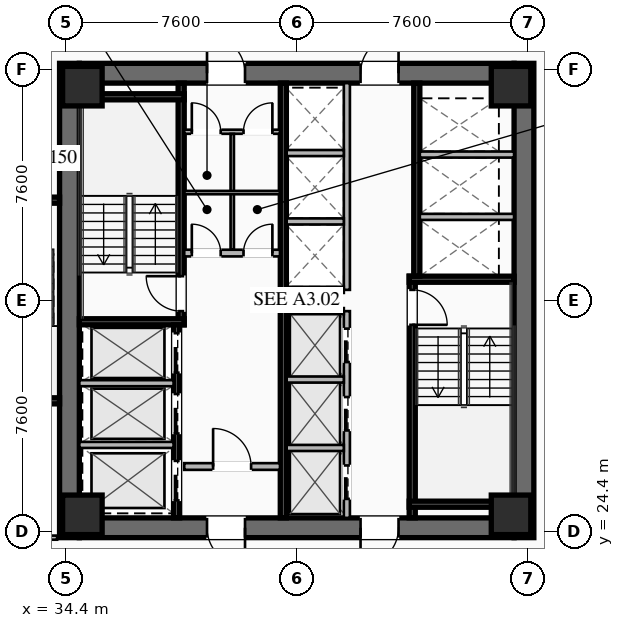
"""IFC4 building model, lengths in metres.
Left out: names, types, materials, properties, quantities, classifications, styles, units other than length and angle.
Written with IfcOpenShell. Run it as: python <this file> out.ifc"""

import sys

from ifc_helpers import new_model, si_unit, direction, frame, frame_2d, origin, origin_2d, place, context, subcontext, project, spatial, rectangle, hollow_rectangle, extrude, element, fill, save


model = new_model("IFC4")
c1 = context("Model", 3, precision=1e-05, world=origin(), true_north=direction((0.0, 1.0)))
c2 = subcontext(c1, "Body", "Model", "MODEL_VIEW")
j1 = project(units=[si_unit("LENGTHUNIT", "METRE"), si_unit("PLANEANGLEUNIT", "RADIAN")], contexts=[c1])
p1 = place(None, origin())
s1 = spatial("IfcSite", under=j1, at=p1, CompositionType="ELEMENT")
p2 = place(p1, origin())
s2 = spatial("IfcBuilding", under=s1, at=p2, CompositionType="ELEMENT")
p3 = place(p2, frame((0.0, 0.0, 45.9)))
s3 = spatial("IfcBuildingStorey", under=s2, at=p3, CompositionType="ELEMENT", Elevation=45.9)
for number, where, z_axis, x_axis in (
    (1, (34.525, 24.2, 0.0), (0.0, 0.0, 1.0), (0.0, 1.0, 0.0)),
    (2, (49.475, 39.8, 0.0), (0.0, 0.0, 1.0), (0.0, -1.0, 0.0)),
):
    element("IfcWall", number, at=place(p3, frame(where, z_axis=z_axis, x_axis=x_axis)), inside=s3, PredefinedType="SHEAR", context=c2, shape_type="SweptSolid", body=[
        extrude(rectangle(XDim=15.6, YDim=0.65, at=frame_2d((7.8, 0.0))), origin(), (0.0, 0.0, 1.0), 3.55),
    ])
p4 = place(p3, frame((49.15, 24.525, 0.0), z_axis=(0.0, 0.0, 1.0), x_axis=(-1.0, 0.0, 0.0)))
e3 = element("IfcWall", 3, at=p4, inside=s3, PredefinedType="SHEAR", context=c2, shape_type="SweptSolid", body=[
    extrude(rectangle(XDim=14.3, YDim=0.65, at=frame_2d((7.15, 0.0))), origin(), (0.0, 0.0, 1.0), 3.55),
])
p5 = place(p4, frame((8.85, 0.0, 0.0)))
e4 = element("IfcOpeningElement", 4, at=p5, cuts=e3, PredefinedType="OPENING", context=c2, shape_type="SweptSolid", body=[
    extrude(rectangle(XDim=1.25, YDim=2.25, at=frame_2d((0.625, 1.125))), frame((0.0, 0.335, 0.0), z_axis=(0.0, -1.0, 0.0), x_axis=(1.0, 0.0, 0.0)), (0.0, 0.0, 1.0), 0.67),
])
p6 = place(p4, frame((3.8, 0.0, 0.0)))
e5 = element("IfcOpeningElement", 5, at=p6, cuts=e3, PredefinedType="OPENING", context=c2, shape_type="SweptSolid", body=[
    extrude(rectangle(XDim=1.25, YDim=2.25, at=frame_2d((0.625, 1.125))), frame((0.0, 0.335, 0.0), z_axis=(0.0, -1.0, 0.0), x_axis=(1.0, 0.0, 0.0)), (0.0, 0.0, 1.0), 0.67),
])
p7 = place(p3, frame((34.85, 39.475, 0.0), z_axis=(0.0, 0.0, 1.0), x_axis=(1.0, 0.0, 0.0)))
e6 = element("IfcWall", 6, at=p7, inside=s3, PredefinedType="SHEAR", context=c2, shape_type="SweptSolid", body=[
    extrude(rectangle(XDim=14.3, YDim=0.65, at=frame_2d((7.15, 0.0))), origin(), (0.0, 0.0, 1.0), 3.55),
])
p8 = place(p7, frame((4.2, 0.0, 0.0)))
e7 = element("IfcOpeningElement", 7, at=p8, cuts=e6, PredefinedType="OPENING", context=c2, shape_type="SweptSolid", body=[
    extrude(rectangle(XDim=1.25, YDim=2.25, at=frame_2d((0.625, 1.125))), frame((0.0, 0.335, 0.0), z_axis=(0.0, -1.0, 0.0), x_axis=(1.0, 0.0, 0.0)), (0.0, 0.0, 1.0), 0.67),
])
p9 = place(p7, frame((9.25, 0.0, 0.0)))
e8 = element("IfcOpeningElement", 8, at=p9, cuts=e6, PredefinedType="OPENING", context=c2, shape_type="SweptSolid", body=[
    extrude(rectangle(XDim=1.25, YDim=2.25, at=frame_2d((0.625, 1.125))), frame((0.0, 0.335, 0.0), z_axis=(0.0, -1.0, 0.0), x_axis=(1.0, 0.0, 0.0)), (0.0, 0.0, 1.0), 0.67),
])
for number, where, z_axis, x_axis in (
    (9, (34.95, 24.95, 0.0), (0.0, 0.0, 1.0), (1.0, 0.0, 0.0)),
    (10, (49.05, 24.95, 0.0), (0.0, 0.0, 1.0), (1.0, 0.0, 0.0)),
    (11, (49.05, 39.05, 0.0), (0.0, 0.0, 1.0), (1.0, 0.0, 0.0)),
    (12, (34.95, 39.05, 0.0), (0.0, 0.0, 1.0), (1.0, 0.0, 0.0)),
):
    element("IfcColumn", number, at=place(p3, frame(where, z_axis=z_axis, x_axis=x_axis)), inside=s3, PredefinedType="COLUMN", context=c2, shape_type="SweptSolid", body=[
        extrude(hollow_rectangle(XDim=1.3, YDim=1.3, WallThickness=0.05, at=origin_2d()), origin(), (0.0, 0.0, 1.0), 3.35),
    ])
p10 = place(p3, frame((38.2, 31.2, 0.0), z_axis=(0.0, 0.0, 1.0), x_axis=(0.0, 1.0, 0.0)))
e13 = element("IfcWall", 13, at=p10, inside=s3, PredefinedType="SHEAR", context=c2, shape_type="SweptSolid", body=[
    extrude(rectangle(XDim=7.95, YDim=0.2, at=frame_2d((3.975, 0.0))), origin(), (0.0, 0.0, 1.0), 3.35),
])
p11 = place(p10, frame((0.45, 0.0, 0.0)))
e14 = element("IfcOpeningElement", 14, at=p11, cuts=e13, PredefinedType="OPENING", context=c2, shape_type="SweptSolid", body=[
    extrude(rectangle(XDim=1.15, YDim=2.2, at=frame_2d((0.575, 1.1))), frame((0.0, 0.11, 0.0), z_axis=(0.0, -1.0, 0.0), x_axis=(1.0, 0.0, 0.0)), (0.0, 0.0, 1.0), 0.22),
])
for number, where, z_axis, x_axis in (
    (15, (34.85, 31.3, 0.0), (0.0, 0.0, 1.0), (1.0, 0.0, 0.0)),
    (16, (34.85, 38.7, 0.0), (0.0, 0.0, 1.0), (1.0, 0.0, 0.0)),
):
    element("IfcWall", number, at=place(p3, frame(where, z_axis=z_axis, x_axis=x_axis)), inside=s3, PredefinedType="SHEAR", context=c2, shape_type="SweptSolid", body=[
        extrude(rectangle(XDim=3.45, YDim=0.2, at=frame_2d((1.725, 0.0))), origin(), (0.0, 0.0, 1.0), 3.35),
    ])
p12 = place(p3, frame((45.8, 32.8, 0.0), z_axis=(0.0, 0.0, 1.0), x_axis=(0.0, -1.0, 0.0)))
e17 = element("IfcWall", 17, at=p12, inside=s3, PredefinedType="SHEAR", context=c2, shape_type="SweptSolid", body=[
    extrude(rectangle(XDim=7.95, YDim=0.2, at=frame_2d((3.975, 0.0))), origin(), (0.0, 0.0, 1.0), 3.35),
])
p13 = place(p12, frame((0.45, 0.0, 0.0)))
e18 = element("IfcOpeningElement", 18, at=p13, cuts=e17, PredefinedType="OPENING", context=c2, shape_type="SweptSolid", body=[
    extrude(rectangle(XDim=1.15, YDim=2.2, at=frame_2d((0.575, 1.1))), frame((0.0, 0.11, 0.0), z_axis=(0.0, -1.0, 0.0), x_axis=(1.0, 0.0, 0.0)), (0.0, 0.0, 1.0), 0.22),
])
for number, where, z_axis, x_axis in (
    (19, (45.7, 32.7, 0.0), (0.0, 0.0, 1.0), (1.0, 0.0, 0.0)),
    (20, (45.7, 25.3, 0.0), (0.0, 0.0, 1.0), (1.0, 0.0, 0.0)),
):
    element("IfcWall", number, at=place(p3, frame(where, z_axis=z_axis, x_axis=x_axis)), inside=s3, PredefinedType="SHEAR", context=c2, shape_type="SweptSolid", body=[
        extrude(rectangle(XDim=3.45, YDim=0.2, at=frame_2d((1.725, 0.0))), origin(), (0.0, 0.0, 1.0), 3.35),
    ])
p14 = place(p3, frame((41.56, 24.85, 0.0), z_axis=(0.0, 0.0, 1.0), x_axis=(0.0, 1.0, 0.0)))
e21 = element("IfcWall", 21, at=p14, inside=s3, PredefinedType="SHEAR", context=c2, shape_type="SweptSolid", body=[
    extrude(rectangle(XDim=14.3, YDim=0.2, at=frame_2d((7.15, 0.0))), origin(), (0.0, 0.0, 1.0), 3.35),
])
p15 = place(p3, frame((38.3, 33.56, 0.0), z_axis=(0.0, 0.0, 1.0), x_axis=(1.0, 0.0, 0.0)))
e22 = element("IfcWall", 22, at=p15, inside=s3, PredefinedType="SOLIDWALL", context=c2, shape_type="SweptSolid", body=[
    extrude(rectangle(XDim=3.15, YDim=0.22, at=frame_2d((1.575, 0.0))), origin(), (0.0, 0.0, 1.0), 2.703),
])
p16 = place(p15, frame((0.25, 0.0, 0.0)))
e23 = element("IfcOpeningElement", 23, at=p16, cuts=e22, PredefinedType="OPENING", context=c2, shape_type="SweptSolid", body=[
    extrude(rectangle(XDim=0.95, YDim=2.05, at=frame_2d((0.475, 1.025))), frame((0.0, 0.12, 0.0), z_axis=(0.0, -1.0, 0.0), x_axis=(1.0, 0.0, 0.0)), (0.0, 0.0, 1.0), 0.24),
])
p17 = place(p15, frame((1.95, 0.0, 0.0)))
e24 = element("IfcOpeningElement", 24, at=p17, cuts=e22, PredefinedType="OPENING", context=c2, shape_type="SweptSolid", body=[
    extrude(rectangle(XDim=0.95, YDim=2.05, at=frame_2d((0.475, 1.025))), frame((0.0, 0.12, 0.0), z_axis=(0.0, -1.0, 0.0), x_axis=(1.0, 0.0, 0.0)), (0.0, 0.0, 1.0), 0.24),
])
p18 = place(p3, frame((38.3, 26.54, 0.0), z_axis=(0.0, 0.0, 1.0), x_axis=(1.0, 0.0, 0.0)))
e25 = element("IfcWall", 25, at=p18, inside=s3, PredefinedType="SOLIDWALL", context=c2, shape_type="SweptSolid", body=[
    extrude(rectangle(XDim=3.15, YDim=0.22, at=frame_2d((1.575, 0.0))), origin(), (0.0, 0.0, 1.0), 2.703),
])
p19 = place(p18, frame((0.95, 0.0, 0.0)))
e26 = element("IfcOpeningElement", 26, at=p19, cuts=e25, PredefinedType="OPENING", context=c2, shape_type="SweptSolid", body=[
    extrude(rectangle(XDim=1.25, YDim=2.25, at=frame_2d((0.625, 1.125))), frame((0.0, 0.12, 0.0), z_axis=(0.0, -1.0, 0.0), x_axis=(1.0, 0.0, 0.0)), (0.0, 0.0, 1.0), 0.24),
])
p20 = place(p3, frame((38.05, 24.85, 0.0), z_axis=(0.0, 0.0, 1.0), x_axis=(0.0, 1.0, 0.0)))
e27 = element("IfcWall", 27, at=p20, inside=s3, PredefinedType="SHEAR", context=c2, shape_type="SweptSolid", body=[
    extrude(rectangle(XDim=6.35, YDim=0.2, at=frame_2d((3.175, 0.0))), origin(), (0.0, 0.0, 1.0), 3.35),
])
p21 = place(p20, frame((4.775, 0.0, 0.0)))
e28 = element("IfcOpeningElement", 28, at=p21, cuts=e27, PredefinedType="OPENING", context=c2, shape_type="SweptSolid", body=[
    extrude(rectangle(XDim=1.3, YDim=2.25, at=frame_2d((0.65, 1.125))), frame((0.0, 0.11, 0.0), z_axis=(0.0, -1.0, 0.0), x_axis=(1.0, 0.0, 0.0)), (0.0, 0.0, 1.0), 0.22),
])
p22 = place(p20, frame((2.775, 0.0, 0.0)))
e29 = element("IfcOpeningElement", 29, at=p22, cuts=e27, PredefinedType="OPENING", context=c2, shape_type="SweptSolid", body=[
    extrude(rectangle(XDim=1.3, YDim=2.25, at=frame_2d((0.65, 1.125))), frame((0.0, 0.11, 0.0), z_axis=(0.0, -1.0, 0.0), x_axis=(1.0, 0.0, 0.0)), (0.0, 0.0, 1.0), 0.22),
])
p23 = place(p20, frame((0.575, 0.0, 0.0)))
e30 = element("IfcOpeningElement", 30, at=p23, cuts=e27, PredefinedType="OPENING", context=c2, shape_type="SweptSolid", body=[
    extrude(rectangle(XDim=1.3, YDim=2.25, at=frame_2d((0.65, 1.125))), frame((0.0, 0.11, 0.0), z_axis=(0.0, -1.0, 0.0), x_axis=(1.0, 0.0, 0.0)), (0.0, 0.0, 1.0), 0.22),
])
for number, where, z_axis, x_axis in (
    (31, (34.85, 27.25, 0.0), (0.0, 0.0, 1.0), (1.0, 0.0, 0.0)),
    (32, (34.85, 29.28, 0.0), (0.0, 0.0, 1.0), (1.0, 0.0, 0.0)),
):
    element("IfcWall", number, at=place(p3, frame(where, z_axis=z_axis, x_axis=x_axis)), inside=s3, PredefinedType="SOLIDWALL", context=c2, shape_type="SweptSolid", body=[
        extrude(rectangle(XDim=3.1, YDim=0.2, at=frame_2d((1.55, 0.0))), origin(), (0.0, 0.0, 1.0), 3.35),
    ])
p24 = place(p3, frame((45.95, 39.15, 0.0), z_axis=(0.0, 0.0, 1.0), x_axis=(0.0, -1.0, 0.0)))
e33 = element("IfcWall", 33, at=p24, inside=s3, PredefinedType="SHEAR", context=c2, shape_type="SweptSolid", body=[
    extrude(rectangle(XDim=6.35, YDim=0.2, at=frame_2d((3.175, 0.0))), origin(), (0.0, 0.0, 1.0), 3.35),
])
for number, where, z_axis, x_axis in (
    (34, (46.05, 34.75, 0.0), (0.0, 0.0, 1.0), (1.0, 0.0, 0.0)),
    (35, (46.05, 36.8, 0.0), (0.0, 0.0, 1.0), (1.0, 0.0, 0.0)),
):
    element("IfcWall", number, at=place(p3, frame(where, z_axis=z_axis, x_axis=x_axis)), inside=s3, PredefinedType="SOLIDWALL", context=c2, shape_type="SweptSolid", body=[
        extrude(rectangle(XDim=3.1, YDim=0.2, at=frame_2d((1.55, 0.0))), origin(), (0.0, 0.0, 1.0), 3.35),
    ])
p25 = place(p3, frame((38.3, 37.55, 0.0), z_axis=(0.0, 0.0, 1.0), x_axis=(1.0, 0.0, 0.0)))
e36 = element("IfcWall", 36, at=p25, inside=s3, PredefinedType="PARTITIONING", context=c2, shape_type="SweptSolid", body=[
    extrude(rectangle(XDim=3.15, YDim=0.135, at=frame_2d((1.575, 0.0))), origin(), (0.0, 0.0, 1.0), 2.703),
])
p26 = place(p25, frame((0.25, 0.0, 0.0)))
e37 = element("IfcOpeningElement", 37, at=p26, cuts=e36, PredefinedType="OPENING", context=c2, shape_type="SweptSolid", body=[
    extrude(rectangle(XDim=0.95, YDim=2.05, at=frame_2d((0.475, 1.025))), frame((0.0, 0.077, 0.0), z_axis=(0.0, -1.0, 0.0), x_axis=(1.0, 0.0, 0.0)), (0.0, 0.0, 1.0), 0.155),
])
p27 = place(p25, frame((1.95, 0.0, 0.0)))
e38 = element("IfcOpeningElement", 38, at=p27, cuts=e36, PredefinedType="OPENING", context=c2, shape_type="SweptSolid", body=[
    extrude(rectangle(XDim=0.95, YDim=2.05, at=frame_2d((0.475, 1.025))), frame((0.0, 0.077, 0.0), z_axis=(0.0, -1.0, 0.0), x_axis=(1.0, 0.0, 0.0)), (0.0, 0.0, 1.0), 0.155),
])
p28 = place(p3, frame((39.88, 33.68, 0.0), z_axis=(0.0, 0.0, 1.0), x_axis=(0.0, 1.0, 0.0)))
e39 = element("IfcWall", 39, at=p28, inside=s3, PredefinedType="PARTITIONING", context=c2, shape_type="SweptSolid", body=[
    extrude(rectangle(XDim=3.8, YDim=0.11, at=frame_2d((1.9, 0.0))), origin(), (0.0, 0.0, 1.0), 2.703),
])
p29 = place(p3, frame((38.3, 35.55, 0.0), z_axis=(0.0, 0.0, 1.0), x_axis=(1.0, 0.0, 0.0)))
e40 = element("IfcWall", 40, at=p29, inside=s3, PredefinedType="PARTITIONING", context=c2, shape_type="SweptSolid", body=[
    extrude(rectangle(XDim=3.15, YDim=0.11, at=frame_2d((1.575, 0.0))), origin(), (0.0, 0.0, 1.0), 2.703),
])
p30 = place(p3, frame((43.65, 24.85, 0.0), z_axis=(0.0, 0.0, 1.0), x_axis=(0.0, 1.0, 0.0)))
e41 = element("IfcWall", 41, at=p30, inside=s3, PredefinedType="SOLIDWALL", context=c2, shape_type="SweptSolid", body=[
    extrude(rectangle(XDim=6.8, YDim=0.2, at=frame_2d((3.4, 0.0))), origin(), (0.0, 0.0, 1.0), 3.35),
])
p31 = place(p30, frame((0.625, 0.0, 0.0)))
e42 = element("IfcOpeningElement", 42, at=p31, cuts=e41, PredefinedType="OPENING", context=c2, shape_type="SweptSolid", body=[
    extrude(rectangle(XDim=1.1, YDim=2.2, at=frame_2d((0.55, 1.1))), frame((0.0, 0.11, 0.0), z_axis=(0.0, -1.0, 0.0), x_axis=(1.0, 0.0, 0.0)), (0.0, 0.0, 1.0), 0.22),
])
p32 = place(p30, frame((2.875, 0.0, 0.0)))
e43 = element("IfcOpeningElement", 43, at=p32, cuts=e41, PredefinedType="OPENING", context=c2, shape_type="SweptSolid", body=[
    extrude(rectangle(XDim=1.1, YDim=2.2, at=frame_2d((0.55, 1.1))), frame((0.0, 0.11, 0.0), z_axis=(0.0, -1.0, 0.0), x_axis=(1.0, 0.0, 0.0)), (0.0, 0.0, 1.0), 0.22),
])
p33 = place(p30, frame((5.125, 0.0, 0.0)))
e44 = element("IfcOpeningElement", 44, at=p33, cuts=e41, PredefinedType="OPENING", context=c2, shape_type="SweptSolid", body=[
    extrude(rectangle(XDim=1.1, YDim=2.2, at=frame_2d((0.55, 1.1))), frame((0.0, 0.11, 0.0), z_axis=(0.0, -1.0, 0.0), x_axis=(1.0, 0.0, 0.0)), (0.0, 0.0, 1.0), 0.22),
])
for number, where, z_axis, x_axis in (
    (45, (41.67, 27.15, 0.0), (0.0, 0.0, 1.0), (1.0, 0.0, 0.0)),
    (46, (41.67, 29.4, 0.0), (0.0, 0.0, 1.0), (1.0, 0.0, 0.0)),
    (47, (41.67, 31.65, 0.0), (0.0, 0.0, 1.0), (1.0, 0.0, 0.0)),
):
    element("IfcWall", number, at=place(p3, frame(where, z_axis=z_axis, x_axis=x_axis)), inside=s3, PredefinedType="SOLIDWALL", context=c2, shape_type="SweptSolid", body=[
        extrude(rectangle(XDim=1.88, YDim=0.2, at=frame_2d((0.94, 0.0))), origin(), (0.0, 0.0, 1.0), 3.35),
    ])
p34 = place(p3, frame((43.65, 32.35, 0.0), z_axis=(0.0, 0.0, 1.0), x_axis=(0.0, 1.0, 0.0)))
e48 = element("IfcWall", 48, at=p34, inside=s3, PredefinedType="SOLIDWALL", context=c2, shape_type="SweptSolid", body=[
    extrude(rectangle(XDim=6.8, YDim=0.2, at=frame_2d((3.4, 0.0))), origin(), (0.0, 0.0, 1.0), 3.35),
])
for number, where, z_axis, x_axis in (
    (49, (41.67, 32.35, 0.0), (0.0, 0.0, 1.0), (1.0, 0.0, 0.0)),
    (50, (41.67, 34.6, 0.0), (0.0, 0.0, 1.0), (1.0, 0.0, 0.0)),
    (51, (41.67, 36.85, 0.0), (0.0, 0.0, 1.0), (1.0, 0.0, 0.0)),
):
    element("IfcWall", number, at=place(p3, frame(where, z_axis=z_axis, x_axis=x_axis)), inside=s3, PredefinedType="SOLIDWALL", context=c2, shape_type="SweptSolid", body=[
        extrude(rectangle(XDim=1.88, YDim=0.2, at=frame_2d((0.94, 0.0))), origin(), (0.0, 0.0, 1.0), 3.35),
    ])
p35 = place(p3, frame((34.2, 35.3, 0.0), z_axis=(0.0, 0.0, 1.0), x_axis=(-1.0, 0.0, 0.0)))
e52 = element("IfcWall", 52, at=p35, inside=s3, PredefinedType="SHEAR", context=c2, shape_type="SweptSolid", body=[
    extrude(rectangle(XDim=3.4, YDim=0.2, at=frame_2d((1.7, 0.0))), origin(), (0.0, 0.0, 1.0), 3.35),
])
p36 = place(p35, frame((0.275, 0.0, 0.0)))
e53 = element("IfcOpeningElement", 53, at=p36, cuts=e52, PredefinedType="OPENING", context=c2, shape_type="SweptSolid", body=[
    extrude(rectangle(XDim=1.15, YDim=2.2, at=frame_2d((0.575, 1.1))), frame((0.0, 0.11, 0.0), z_axis=(0.0, -1.0, 0.0), x_axis=(1.0, 0.0, 0.0)), (0.0, 0.0, 1.0), 0.22),
])
p37 = place(p3, frame((30.8, 28.7, 0.0), z_axis=(0.0, 0.0, 1.0), x_axis=(1.0, 0.0, 0.0)))
e54 = element("IfcWall", 54, at=p37, inside=s3, PredefinedType="SHEAR", context=c2, shape_type="SweptSolid", body=[
    extrude(rectangle(XDim=3.4, YDim=0.2, at=frame_2d((1.7, 0.0))), origin(), (0.0, 0.0, 1.0), 3.35),
])
p38 = place(p3, frame((19.27, 24.2, 0.0), z_axis=(0.0, 0.0, 1.0), x_axis=(1.0, 0.0, 0.0)))
e55 = element("IfcWall", 55, at=p38, inside=s3, PredefinedType="PARTITIONING", context=c2, shape_type="SweptSolid", body=[
    extrude(rectangle(XDim=14.85, YDim=0.135, at=frame_2d((7.425, 0.0))), origin(), (0.0, 0.0, 1.0), 2.703),
])
p39 = place(p38, frame((11.855, 0.0, 0.0)))
e56 = element("IfcOpeningElement", 56, at=p39, cuts=e55, PredefinedType="OPENING", context=c2, shape_type="SweptSolid", body=[
    extrude(rectangle(XDim=0.95, YDim=2.05, at=frame_2d((0.475, 1.025))), frame((0.0, 0.077, 0.0), z_axis=(0.0, -1.0, 0.0), x_axis=(1.0, 0.0, 0.0)), (0.0, 0.0, 1.0), 0.155),
])
p40 = place(p8, origin())
e57 = element("IfcDoor", 57, at=p40, inside=s3, OperationType="SINGLE_SWING_LEFT", PredefinedType="DOOR", context=c2, shape_type="SweptSolid", body=[
    extrude(rectangle(XDim=1.25, YDim=2.25, at=frame_2d((0.625, 1.125))), frame((0.0, 0.025, 0.0), z_axis=(0.0, -1.0, 0.0), x_axis=(1.0, 0.0, 0.0)), (0.0, 0.0, 1.0), 0.05),
])
fill(e7, e57)
p41 = place(p9, origin())
e58 = element("IfcDoor", 58, at=p41, inside=s3, OperationType="SINGLE_SWING_RIGHT", PredefinedType="DOOR", context=c2, shape_type="SweptSolid", body=[
    extrude(rectangle(XDim=1.25, YDim=2.25, at=frame_2d((0.625, 1.125))), frame((0.0, 0.025, 0.0), z_axis=(0.0, -1.0, 0.0), x_axis=(1.0, 0.0, 0.0)), (0.0, 0.0, 1.0), 0.05),
])
fill(e8, e58)
p42 = place(p5, origin())
e59 = element("IfcDoor", 59, at=p42, inside=s3, OperationType="SINGLE_SWING_LEFT", PredefinedType="DOOR", context=c2, shape_type="SweptSolid", body=[
    extrude(rectangle(XDim=1.25, YDim=2.25, at=frame_2d((0.625, 1.125))), frame((0.0, 0.025, 0.0), z_axis=(0.0, -1.0, 0.0), x_axis=(1.0, 0.0, 0.0)), (0.0, 0.0, 1.0), 0.05),
])
fill(e4, e59)
p43 = place(p6, origin())
e60 = element("IfcDoor", 60, at=p43, inside=s3, OperationType="SINGLE_SWING_RIGHT", PredefinedType="DOOR", context=c2, shape_type="SweptSolid", body=[
    extrude(rectangle(XDim=1.25, YDim=2.25, at=frame_2d((0.625, 1.125))), frame((0.0, 0.025, 0.0), z_axis=(0.0, -1.0, 0.0), x_axis=(1.0, 0.0, 0.0)), (0.0, 0.0, 1.0), 0.05),
])
fill(e5, e60)
p44 = place(p11, origin())
e61 = element("IfcDoor", 61, at=p44, inside=s3, OperationType="SINGLE_SWING_RIGHT", PredefinedType="DOOR", context=c2, shape_type="SweptSolid", body=[
    extrude(rectangle(XDim=1.15, YDim=2.2, at=frame_2d((0.575, 1.1))), frame((0.0, 0.025, 0.0), z_axis=(0.0, -1.0, 0.0), x_axis=(1.0, 0.0, 0.0)), (0.0, 0.0, 1.0), 0.05),
])
fill(e14, e61)
p45 = place(p13, origin())
e62 = element("IfcDoor", 62, at=p45, inside=s3, OperationType="SINGLE_SWING_RIGHT", PredefinedType="DOOR", context=c2, shape_type="SweptSolid", body=[
    extrude(rectangle(XDim=1.15, YDim=2.2, at=frame_2d((0.575, 1.1))), frame((0.0, 0.025, 0.0), z_axis=(0.0, -1.0, 0.0), x_axis=(1.0, 0.0, 0.0)), (0.0, 0.0, 1.0), 0.05),
])
fill(e18, e62)
p46 = place(p19, origin())
e63 = element("IfcDoor", 63, at=p46, inside=s3, OperationType="SINGLE_SWING_LEFT", PredefinedType="DOOR", context=c2, shape_type="SweptSolid", body=[
    extrude(rectangle(XDim=1.25, YDim=2.25, at=frame_2d((0.625, 1.125))), frame((0.0, 0.025, 0.0), z_axis=(0.0, -1.0, 0.0), x_axis=(1.0, 0.0, 0.0)), (0.0, 0.0, 1.0), 0.05),
])
fill(e26, e63)
p47 = place(p26, origin())
e64 = element("IfcDoor", 64, at=p47, inside=s3, OperationType="SINGLE_SWING_LEFT", PredefinedType="DOOR", context=c2, shape_type="SweptSolid", body=[
    extrude(rectangle(XDim=0.95, YDim=2.05, at=frame_2d((0.475, 1.025))), frame((0.0, 0.025, 0.0), z_axis=(0.0, -1.0, 0.0), x_axis=(1.0, 0.0, 0.0)), (0.0, 0.0, 1.0), 0.05),
])
fill(e37, e64)
p48 = place(p27, origin())
e65 = element("IfcDoor", 65, at=p48, inside=s3, OperationType="SINGLE_SWING_RIGHT", PredefinedType="DOOR", context=c2, shape_type="SweptSolid", body=[
    extrude(rectangle(XDim=0.95, YDim=2.05, at=frame_2d((0.475, 1.025))), frame((0.0, 0.025, 0.0), z_axis=(0.0, -1.0, 0.0), x_axis=(1.0, 0.0, 0.0)), (0.0, 0.0, 1.0), 0.05),
])
fill(e38, e65)
p49 = place(p16, origin())
e66 = element("IfcDoor", 66, at=p49, inside=s3, OperationType="SINGLE_SWING_LEFT", PredefinedType="DOOR", context=c2, shape_type="SweptSolid", body=[
    extrude(rectangle(XDim=0.95, YDim=2.05, at=frame_2d((0.475, 1.025))), frame((0.0, 0.025, 0.0), z_axis=(0.0, -1.0, 0.0), x_axis=(1.0, 0.0, 0.0)), (0.0, 0.0, 1.0), 0.05),
])
fill(e23, e66)
p50 = place(p17, origin())
e67 = element("IfcDoor", 67, at=p50, inside=s3, OperationType="SINGLE_SWING_RIGHT", PredefinedType="DOOR", context=c2, shape_type="SweptSolid", body=[
    extrude(rectangle(XDim=0.95, YDim=2.05, at=frame_2d((0.475, 1.025))), frame((0.0, 0.025, 0.0), z_axis=(0.0, -1.0, 0.0), x_axis=(1.0, 0.0, 0.0)), (0.0, 0.0, 1.0), 0.05),
])
fill(e24, e67)
p51 = place(p21, origin())
e68 = element("IfcDoor", 68, at=p51, inside=s3, OperationType="SLIDING_TO_LEFT", PredefinedType="DOOR", context=c2, shape_type="SweptSolid", body=[
    extrude(rectangle(XDim=1.3, YDim=2.25, at=frame_2d((0.65, 1.125))), frame((0.0, 0.025, 0.0), z_axis=(0.0, -1.0, 0.0), x_axis=(1.0, 0.0, 0.0)), (0.0, 0.0, 1.0), 0.05),
])
fill(e28, e68)
p52 = place(p22, origin())
e69 = element("IfcDoor", 69, at=p52, inside=s3, OperationType="SLIDING_TO_LEFT", PredefinedType="DOOR", context=c2, shape_type="SweptSolid", body=[
    extrude(rectangle(XDim=1.3, YDim=2.25, at=frame_2d((0.65, 1.125))), frame((0.0, 0.025, 0.0), z_axis=(0.0, -1.0, 0.0), x_axis=(1.0, 0.0, 0.0)), (0.0, 0.0, 1.0), 0.05),
])
fill(e29, e69)
p53 = place(p23, origin())
e70 = element("IfcDoor", 70, at=p53, inside=s3, OperationType="SLIDING_TO_LEFT", PredefinedType="DOOR", context=c2, shape_type="SweptSolid", body=[
    extrude(rectangle(XDim=1.3, YDim=2.25, at=frame_2d((0.65, 1.125))), frame((0.0, 0.025, 0.0), z_axis=(0.0, -1.0, 0.0), x_axis=(1.0, 0.0, 0.0)), (0.0, 0.0, 1.0), 0.05),
])
fill(e30, e70)
p54 = place(p31, origin())
e71 = element("IfcDoor", 71, at=p54, inside=s3, OperationType="SLIDING_TO_LEFT", PredefinedType="DOOR", context=c2, shape_type="SweptSolid", body=[
    extrude(rectangle(XDim=1.1, YDim=2.2, at=frame_2d((0.55, 1.1))), frame((0.0, 0.025, 0.0), z_axis=(0.0, -1.0, 0.0), x_axis=(1.0, 0.0, 0.0)), (0.0, 0.0, 1.0), 0.05),
])
fill(e42, e71)
p55 = place(p32, origin())
e72 = element("IfcDoor", 72, at=p55, inside=s3, OperationType="SLIDING_TO_LEFT", PredefinedType="DOOR", context=c2, shape_type="SweptSolid", body=[
    extrude(rectangle(XDim=1.1, YDim=2.2, at=frame_2d((0.55, 1.1))), frame((0.0, 0.025, 0.0), z_axis=(0.0, -1.0, 0.0), x_axis=(1.0, 0.0, 0.0)), (0.0, 0.0, 1.0), 0.05),
])
fill(e43, e72)
p56 = place(p33, origin())
e73 = element("IfcDoor", 73, at=p56, inside=s3, OperationType="SLIDING_TO_LEFT", PredefinedType="DOOR", context=c2, shape_type="SweptSolid", body=[
    extrude(rectangle(XDim=1.1, YDim=2.2, at=frame_2d((0.55, 1.1))), frame((0.0, 0.025, 0.0), z_axis=(0.0, -1.0, 0.0), x_axis=(1.0, 0.0, 0.0)), (0.0, 0.0, 1.0), 0.05),
])
fill(e44, e73)
save(model, sys.argv[1])
